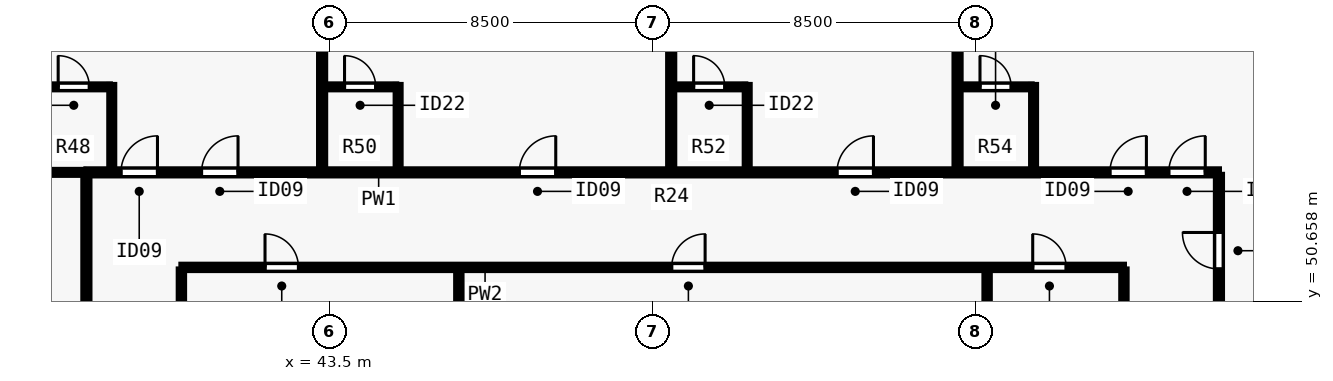
"""IFC4 building model, lengths in metres.
Left out: names, types, materials, properties, quantities, classifications, styles, units other than length and angle.
Written with IfcOpenShell. Run it as: python <this file> out.ifc"""

import sys

from ifc_helpers import new_model, si_unit, direction, frame, frame_2d, origin, place, context, subcontext, project, spatial, rectangle, extrude, element, fill, save


model = new_model("IFC4")
c1 = context("Model", 3, precision=1e-05, world=origin(), true_north=direction((0.0, 1.0)))
c2 = subcontext(c1, "Body", "Model", "MODEL_VIEW")
j1 = project(units=[si_unit("LENGTHUNIT", "METRE"), si_unit("PLANEANGLEUNIT", "RADIAN")], contexts=[c1])
p1 = place(None, origin())
s1 = spatial("IfcSite", under=j1, at=p1, CompositionType="ELEMENT")
p2 = place(p1, origin())
s2 = spatial("IfcBuilding", under=s1, at=p2, CompositionType="ELEMENT")
p3 = place(p2, frame((0.0, 0.0, 86.5)))
s3 = spatial("IfcBuildingStorey", under=s2, at=p3, CompositionType="ELEMENT", Elevation=86.5)
p4 = place(p3, frame((37.1, 54.05, 0.0), z_axis=(0.0, 0.0, 1.0), x_axis=(1.0, 0.0, 0.0)))
e1 = element("IfcWall", 1, at=p4, inside=s3, PredefinedType="PARTITIONING", context=c2, shape_type="SweptSolid", body=[
    extrude(rectangle(XDim=29.8, YDim=0.16, at=frame_2d((14.9, 0.0))), origin(), (0.0, 0.0, 1.0), 3.28),
])
p5 = place(p4, frame((0.91, 0.0, 0.0)))
e2 = element("IfcOpeningElement", 2, at=p5, cuts=e1, PredefinedType="OPENING", context=c2, shape_type="SweptSolid", body=[
    extrude(rectangle(XDim=0.96, YDim=2.15, at=frame_2d((0.48, 1.075))), frame((0.0, 0.09, 0.0), z_axis=(0.0, -1.0, 0.0), x_axis=(1.0, 0.0, 0.0)), (0.0, 0.0, 1.0), 0.18),
])
p6 = place(p4, frame((3.03, 0.0, 0.0)))
e3 = element("IfcOpeningElement", 3, at=p6, cuts=e1, PredefinedType="OPENING", context=c2, shape_type="SweptSolid", body=[
    extrude(rectangle(XDim=0.96, YDim=2.15, at=frame_2d((0.48, 1.075))), frame((0.0, 0.09, 0.0), z_axis=(0.0, -1.0, 0.0), x_axis=(1.0, 0.0, 0.0)), (0.0, 0.0, 1.0), 0.18),
])
p7 = place(p4, frame((11.39, 0.0, 0.0)))
e4 = element("IfcOpeningElement", 4, at=p7, cuts=e1, PredefinedType="OPENING", context=c2, shape_type="SweptSolid", body=[
    extrude(rectangle(XDim=0.96, YDim=2.15, at=frame_2d((0.48, 1.075))), frame((0.0, 0.09, 0.0), z_axis=(0.0, -1.0, 0.0), x_axis=(1.0, 0.0, 0.0)), (0.0, 0.0, 1.0), 0.18),
])
p8 = place(p4, frame((19.75, 0.0, 0.0)))
e5 = element("IfcOpeningElement", 5, at=p8, cuts=e1, PredefinedType="OPENING", context=c2, shape_type="SweptSolid", body=[
    extrude(rectangle(XDim=0.96, YDim=2.15, at=frame_2d((0.48, 1.075))), frame((0.0, 0.09, 0.0), z_axis=(0.0, -1.0, 0.0), x_axis=(1.0, 0.0, 0.0)), (0.0, 0.0, 1.0), 0.18),
])
p9 = place(p4, frame((26.931, 0.0, 0.0)))
e6 = element("IfcOpeningElement", 6, at=p9, cuts=e1, PredefinedType="OPENING", context=c2, shape_type="SweptSolid", body=[
    extrude(rectangle(XDim=0.96, YDim=2.15, at=frame_2d((0.48, 1.075))), frame((0.0, 0.09, 0.0), z_axis=(0.0, -1.0, 0.0), x_axis=(1.0, 0.0, 0.0)), (0.0, 0.0, 1.0), 0.18),
])
p10 = place(p4, frame((28.48, 0.0, 0.0)))
e7 = element("IfcOpeningElement", 7, at=p10, cuts=e1, PredefinedType="OPENING", context=c2, shape_type="SweptSolid", body=[
    extrude(rectangle(XDim=0.96, YDim=2.15, at=frame_2d((0.48, 1.075))), frame((0.0, 0.09, 0.0), z_axis=(0.0, -1.0, 0.0), x_axis=(1.0, 0.0, 0.0)), (0.0, 0.0, 1.0), 0.18),
])
p11 = place(p3, frame((37.1, 24.015, 0.0), z_axis=(0.0, 0.0, 1.0), x_axis=(0.0, 1.0, 0.0)))
e8 = element("IfcWall", 8, at=p11, inside=s3, PredefinedType="PARTITIONING", context=c2, shape_type="SweptSolid", body=[
    extrude(rectangle(XDim=29.97, YDim=0.16, at=frame_2d((14.985, 0.0))), origin(), (0.0, 0.0, 1.0), 3.28),
])
p12 = place(p11, frame((8.134, 0.0, 0.0)))
e9 = element("IfcOpeningElement", 9, at=p12, cuts=e8, PredefinedType="OPENING", context=c2, shape_type="SweptSolid", body=[
    extrude(rectangle(XDim=0.96, YDim=2.15, at=frame_2d((0.48, 1.075))), frame((0.0, 0.09, 0.0), z_axis=(0.0, -1.0, 0.0), x_axis=(1.0, 0.0, 0.0)), (0.0, 0.0, 1.0), 0.18),
])
p13 = place(p11, frame((22.934, 0.0, 0.0)))
e10 = element("IfcOpeningElement", 10, at=p13, cuts=e8, PredefinedType="OPENING", context=c2, shape_type="SweptSolid", body=[
    extrude(rectangle(XDim=0.96, YDim=2.15, at=frame_2d((0.48, 1.075))), frame((0.0, 0.09, 0.0), z_axis=(0.0, -1.0, 0.0), x_axis=(1.0, 0.0, 0.0)), (0.0, 0.0, 1.0), 0.18),
])
p14 = place(p3, frame((66.9, 24.015, 0.0), z_axis=(0.0, 0.0, 1.0), x_axis=(0.0, 1.0, 0.0)))
e11 = element("IfcWall", 11, at=p14, inside=s3, PredefinedType="PARTITIONING", context=c2, shape_type="SweptSolid", body=[
    extrude(rectangle(XDim=29.97, YDim=0.16, at=frame_2d((14.985, 0.0))), origin(), (0.0, 0.0, 1.0), 3.28),
])
p15 = place(p14, frame((3.911, 0.0, 0.0)))
e12 = element("IfcOpeningElement", 12, at=p15, cuts=e11, PredefinedType="OPENING", context=c2, shape_type="SweptSolid", body=[
    extrude(rectangle(XDim=0.96, YDim=2.15, at=frame_2d((0.48, 1.075))), frame((0.0, 0.09, 0.0), z_axis=(0.0, -1.0, 0.0), x_axis=(1.0, 0.0, 0.0)), (0.0, 0.0, 1.0), 0.18),
])
p16 = place(p14, frame((9.544, 0.0, 0.0)))
e13 = element("IfcOpeningElement", 13, at=p16, cuts=e11, PredefinedType="OPENING", context=c2, shape_type="SweptSolid", body=[
    extrude(rectangle(XDim=0.96, YDim=2.15, at=frame_2d((0.48, 1.075))), frame((0.0, 0.09, 0.0), z_axis=(0.0, -1.0, 0.0), x_axis=(1.0, 0.0, 0.0)), (0.0, 0.0, 1.0), 0.18),
])
p17 = place(p14, frame((15.625, 0.0, 0.0)))
e14 = element("IfcOpeningElement", 14, at=p17, cuts=e11, PredefinedType="OPENING", context=c2, shape_type="SweptSolid", body=[
    extrude(rectangle(XDim=0.96, YDim=2.15, at=frame_2d((0.48, 1.075))), frame((0.0, 0.09, 0.0), z_axis=(0.0, -1.0, 0.0), x_axis=(1.0, 0.0, 0.0)), (0.0, 0.0, 1.0), 0.18),
])
p18 = place(p14, frame((21.584, 0.0, 0.0)))
e15 = element("IfcOpeningElement", 15, at=p18, cuts=e11, PredefinedType="OPENING", context=c2, shape_type="SweptSolid", body=[
    extrude(rectangle(XDim=0.96, YDim=2.15, at=frame_2d((0.48, 1.075))), frame((0.0, 0.09, 0.0), z_axis=(0.0, -1.0, 0.0), x_axis=(1.0, 0.0, 0.0)), (0.0, 0.0, 1.0), 0.18),
])
p19 = place(p14, frame((27.494, 0.0, 0.0)))
e16 = element("IfcOpeningElement", 16, at=p19, cuts=e11, PredefinedType="OPENING", context=c2, shape_type="SweptSolid", body=[
    extrude(rectangle(XDim=0.96, YDim=2.15, at=frame_2d((0.48, 1.075))), frame((0.0, 0.09, 0.0), z_axis=(0.0, -1.0, 0.0), x_axis=(1.0, 0.0, 0.0)), (0.0, 0.0, 1.0), 0.18),
])
p20 = place(p3, frame((39.6, 51.55, 0.0), z_axis=(0.0, 0.0, 1.0), x_axis=(1.0, 0.0, 0.0)))
e17 = element("IfcWall", 17, at=p20, inside=s3, PredefinedType="PARTITIONING", context=c2, shape_type="SweptSolid", body=[
    extrude(rectangle(XDim=24.8, YDim=0.14, at=frame_2d((12.4, 0.0))), origin(), (0.0, 0.0, 1.0), 3.28),
])
p21 = place(p20, frame((2.2, 0.0, 0.0)))
e18 = element("IfcOpeningElement", 18, at=p21, cuts=e17, PredefinedType="OPENING", context=c2, shape_type="SweptSolid", body=[
    extrude(rectangle(XDim=0.88, YDim=2.1, at=frame_2d((0.44, 1.05))), frame((0.0, 0.08, 0.0), z_axis=(0.0, -1.0, 0.0), x_axis=(1.0, 0.0, 0.0)), (0.0, 0.0, 1.0), 0.16),
])
p22 = place(p20, frame((12.9, 0.0, 0.0)))
e19 = element("IfcOpeningElement", 19, at=p22, cuts=e17, PredefinedType="OPENING", context=c2, shape_type="SweptSolid", body=[
    extrude(rectangle(XDim=0.88, YDim=2.1, at=frame_2d((0.44, 1.05))), frame((0.0, 0.08, 0.0), z_axis=(0.0, -1.0, 0.0), x_axis=(1.0, 0.0, 0.0)), (0.0, 0.0, 1.0), 0.16),
])
p23 = place(p20, frame((22.4, 0.0, 0.0)))
e20 = element("IfcOpeningElement", 20, at=p23, cuts=e17, PredefinedType="OPENING", context=c2, shape_type="SweptSolid", body=[
    extrude(rectangle(XDim=0.88, YDim=2.1, at=frame_2d((0.44, 1.05))), frame((0.0, 0.08, 0.0), z_axis=(0.0, -1.0, 0.0), x_axis=(1.0, 0.0, 0.0)), (0.0, 0.0, 1.0), 0.16),
])
p24 = place(p3, frame((39.6, 40.8, 0.0), z_axis=(0.0, 0.0, 1.0), x_axis=(0.0, 1.0, 0.0)))
e21 = element("IfcWall", 21, at=p24, inside=s3, PredefinedType="PARTITIONING", context=c2, shape_type="SweptSolid", body=[
    extrude(rectangle(XDim=10.695, YDim=0.14, at=frame_2d((5.348, 0.0))), origin(), (0.0, 0.0, 1.0), 3.28),
])
p25 = place(p24, frame((2.5, 0.0, 0.0)))
e22 = element("IfcOpeningElement", 22, at=p25, cuts=e21, PredefinedType="OPENING", context=c2, shape_type="SweptSolid", body=[
    extrude(rectangle(XDim=0.88, YDim=2.1, at=frame_2d((0.44, 1.05))), frame((0.0, 0.08, 0.0), z_axis=(0.0, -1.0, 0.0), x_axis=(1.0, 0.0, 0.0)), (0.0, 0.0, 1.0), 0.16),
])
p26 = place(p3, frame((64.4, 40.8, 0.0), z_axis=(0.0, 0.0, 1.0), x_axis=(0.0, 1.0, 0.0)))
e23 = element("IfcWall", 23, at=p26, inside=s3, PredefinedType="PARTITIONING", context=c2, shape_type="SweptSolid", body=[
    extrude(rectangle(XDim=10.695, YDim=0.14, at=frame_2d((5.348, 0.0))), origin(), (0.0, 0.0, 1.0), 3.28),
])
p27 = place(p26, frame((2.5, 0.0, 0.0)))
e24 = element("IfcOpeningElement", 24, at=p27, cuts=e23, PredefinedType="OPENING", context=c2, shape_type="SweptSolid", body=[
    extrude(rectangle(XDim=0.88, YDim=2.1, at=frame_2d((0.44, 1.05))), frame((0.0, 0.08, 0.0), z_axis=(0.0, -1.0, 0.0), x_axis=(1.0, 0.0, 0.0)), (0.0, 0.0, 1.0), 0.16),
])
p28 = place(p3, frame((46.9, 47.76, 0.0), z_axis=(0.0, 0.0, 1.0), x_axis=(0.0, 1.0, 0.0)))
e25 = element("IfcWall", 25, at=p28, inside=s3, PredefinedType="PARTITIONING", context=c2, shape_type="SweptSolid", body=[
    extrude(rectangle(XDim=3.735, YDim=0.14, at=frame_2d((1.868, 0.0))), origin(), (0.0, 0.0, 1.0), 3.28),
])
p29 = place(p3, frame((60.8, 47.76, 0.0), z_axis=(0.0, 0.0, 1.0), x_axis=(0.0, 1.0, 0.0)))
e26 = element("IfcWall", 26, at=p29, inside=s3, PredefinedType="PARTITIONING", context=c2, shape_type="SweptSolid", body=[
    extrude(rectangle(XDim=3.735, YDim=0.14, at=frame_2d((1.868, 0.0))), origin(), (0.0, 0.0, 1.0), 2.439),
])
p30 = place(p3, frame((37.768, 54.115, 0.0), z_axis=(0.0, 0.0, 1.0), x_axis=(0.0, 1.0, 0.0)))
e27 = element("IfcWall", 27, at=p30, inside=s3, PredefinedType="PLUMBINGWALL", context=c2, shape_type="SweptSolid", body=[
    extrude(rectangle(XDim=2.235, YDim=0.13, at=frame_2d((1.118, 0.0))), origin(), (0.0, 0.0, 1.0), 2.439),
])
p31 = place(p3, frame((35.833, 56.3, 0.0), z_axis=(0.0, 0.0, 1.0), x_axis=(1.0, 0.0, 0.0)))
e28 = element("IfcWall", 28, at=p31, inside=s3, PredefinedType="PLUMBINGWALL", context=c2, shape_type="SweptSolid", body=[
    extrude(rectangle(XDim=1.885, YDim=0.13, at=frame_2d((0.942, 0.0))), origin(), (0.0, 0.0, 1.0), 3.28),
])
p32 = place(p31, frame((0.525, 0.0, 0.0)))
e29 = element("IfcOpeningElement", 29, at=p32, cuts=e28, PredefinedType="OPENING", context=c2, shape_type="SweptSolid", body=[
    extrude(rectangle(XDim=0.82, YDim=2.1, at=frame_2d((0.41, 1.05))), frame((0.0, 0.075, 0.0), z_axis=(0.0, -1.0, 0.0), x_axis=(1.0, 0.0, 0.0)), (0.0, 0.0, 1.0), 0.15),
])
p33 = place(p3, frame((35.833, 54.05, 0.0), z_axis=(0.0, 0.0, 1.0), x_axis=(1.0, 0.0, 0.0)))
e30 = element("IfcWall", 30, at=p33, inside=s3, PredefinedType="PLUMBINGWALL", context=c2, shape_type="SweptSolid", body=[
    extrude(rectangle(XDim=1.188, YDim=0.13, at=frame_2d((0.594, 0.0))), origin(), (0.0, 0.0, 1.0), 3.28),
])
p34 = place(p3, frame((43.302, 54.115, 0.0), z_axis=(0.0, 0.0, 1.0), x_axis=(0.0, 1.0, 0.0)))
e31 = element("IfcWall", 31, at=p34, inside=s3, PredefinedType="PARTITIONING", context=c2, shape_type="SweptSolid", body=[
    extrude(rectangle(XDim=10.04, YDim=0.16, at=frame_2d((5.02, 0.0))), origin(), (0.0, 0.0, 1.0), 3.28),
])
p35 = place(p3, frame((45.302, 54.115, 0.0), z_axis=(0.0, 0.0, 1.0), x_axis=(0.0, 1.0, 0.0)))
e32 = element("IfcWall", 32, at=p35, inside=s3, PredefinedType="PLUMBINGWALL", context=c2, shape_type="SweptSolid", body=[
    extrude(rectangle(XDim=2.235, YDim=0.13, at=frame_2d((1.118, 0.0))), origin(), (0.0, 0.0, 1.0), 3.28),
])
p36 = place(p3, frame((43.367, 56.3, 0.0), z_axis=(0.0, 0.0, 1.0), x_axis=(1.0, 0.0, 0.0)))
e33 = element("IfcWall", 33, at=p36, inside=s3, PredefinedType="PLUMBINGWALL", context=c2, shape_type="SweptSolid", body=[
    extrude(rectangle(XDim=1.885, YDim=0.13, at=frame_2d((0.942, 0.0))), origin(), (0.0, 0.0, 1.0), 3.28),
])
p37 = place(p36, frame((0.525, 0.0, 0.0)))
e34 = element("IfcOpeningElement", 34, at=p37, cuts=e33, PredefinedType="OPENING", context=c2, shape_type="SweptSolid", body=[
    extrude(rectangle(XDim=0.82, YDim=2.1, at=frame_2d((0.41, 1.05))), frame((0.0, 0.075, 0.0), z_axis=(0.0, -1.0, 0.0), x_axis=(1.0, 0.0, 0.0)), (0.0, 0.0, 1.0), 0.15),
])
p38 = place(p3, frame((52.488, 54.115, 0.0), z_axis=(0.0, 0.0, 1.0), x_axis=(0.0, 1.0, 0.0)))
e35 = element("IfcWall", 35, at=p38, inside=s3, PredefinedType="PARTITIONING", context=c2, shape_type="SweptSolid", body=[
    extrude(rectangle(XDim=10.04, YDim=0.16, at=frame_2d((5.02, 0.0))), origin(), (0.0, 0.0, 1.0), 2.849),
])
p39 = place(p3, frame((54.488, 54.115, 0.0), z_axis=(0.0, 0.0, 1.0), x_axis=(0.0, 1.0, 0.0)))
e36 = element("IfcWall", 36, at=p39, inside=s3, PredefinedType="PLUMBINGWALL", context=c2, shape_type="SweptSolid", body=[
    extrude(rectangle(XDim=2.235, YDim=0.13, at=frame_2d((1.118, 0.0))), origin(), (0.0, 0.0, 1.0), 3.28),
])
p40 = place(p3, frame((52.552, 56.3, 0.0), z_axis=(0.0, 0.0, 1.0), x_axis=(1.0, 0.0, 0.0)))
e37 = element("IfcWall", 37, at=p40, inside=s3, PredefinedType="PLUMBINGWALL", context=c2, shape_type="SweptSolid", body=[
    extrude(rectangle(XDim=1.885, YDim=0.13, at=frame_2d((0.942, 0.0))), origin(), (0.0, 0.0, 1.0), 3.28),
])
p41 = place(p40, frame((0.525, 0.0, 0.0)))
e38 = element("IfcOpeningElement", 38, at=p41, cuts=e37, PredefinedType="OPENING", context=c2, shape_type="SweptSolid", body=[
    extrude(rectangle(XDim=0.82, YDim=2.1, at=frame_2d((0.41, 1.05))), frame((0.0, 0.075, 0.0), z_axis=(0.0, -1.0, 0.0), x_axis=(1.0, 0.0, 0.0)), (0.0, 0.0, 1.0), 0.15),
])
p42 = place(p3, frame((60.022, 54.115, 0.0), z_axis=(0.0, 0.0, 1.0), x_axis=(0.0, 1.0, 0.0)))
e39 = element("IfcWall", 39, at=p42, inside=s3, PredefinedType="PARTITIONING", context=c2, shape_type="SweptSolid", body=[
    extrude(rectangle(XDim=10.115, YDim=0.16, at=frame_2d((5.058, 0.0))), origin(), (0.0, 0.0, 1.0), 3.28),
])
p43 = place(p3, frame((62.022, 54.115, 0.0), z_axis=(0.0, 0.0, 1.0), x_axis=(0.0, 1.0, 0.0)))
e40 = element("IfcWall", 40, at=p43, inside=s3, PredefinedType="PLUMBINGWALL", context=c2, shape_type="SweptSolid", body=[
    extrude(rectangle(XDim=2.235, YDim=0.13, at=frame_2d((1.118, 0.0))), origin(), (0.0, 0.0, 1.0), 3.28),
])
p44 = place(p3, frame((60.087, 56.3, 0.0), z_axis=(0.0, 0.0, 1.0), x_axis=(1.0, 0.0, 0.0)))
e41 = element("IfcWall", 41, at=p44, inside=s3, PredefinedType="PLUMBINGWALL", context=c2, shape_type="SweptSolid", body=[
    extrude(rectangle(XDim=1.885, YDim=0.13, at=frame_2d((0.942, 0.0))), origin(), (0.0, 0.0, 1.0), 3.28),
])
p45 = place(p44, frame((0.525, 0.0, 0.0)))
e42 = element("IfcOpeningElement", 42, at=p45, cuts=e41, PredefinedType="OPENING", context=c2, shape_type="SweptSolid", body=[
    extrude(rectangle(XDim=0.82, YDim=2.1, at=frame_2d((0.41, 1.05))), frame((0.0, 0.075, 0.0), z_axis=(0.0, -1.0, 0.0), x_axis=(1.0, 0.0, 0.0)), (0.0, 0.0, 1.0), 0.15),
])
p46 = place(p21, origin())
e43 = element("IfcDoor", 43, at=p46, inside=s3, OperationType="SINGLE_SWING_LEFT", PredefinedType="DOOR", context=c2, shape_type="SweptSolid", body=[
    extrude(rectangle(XDim=0.88, YDim=2.1, at=frame_2d((0.44, 1.05))), frame((0.0, 0.025, 0.0), z_axis=(0.0, -1.0, 0.0), x_axis=(1.0, 0.0, 0.0)), (0.0, 0.0, 1.0), 0.05),
])
fill(e18, e43)
p47 = place(p22, origin())
e44 = element("IfcDoor", 44, at=p47, inside=s3, OperationType="SINGLE_SWING_RIGHT", PredefinedType="DOOR", context=c2, shape_type="SweptSolid", body=[
    extrude(rectangle(XDim=0.88, YDim=2.1, at=frame_2d((0.44, 1.05))), frame((0.0, 0.025, 0.0), z_axis=(0.0, -1.0, 0.0), x_axis=(1.0, 0.0, 0.0)), (0.0, 0.0, 1.0), 0.05),
])
fill(e19, e44)
p48 = place(p23, origin())
e45 = element("IfcDoor", 45, at=p48, inside=s3, OperationType="SINGLE_SWING_LEFT", PredefinedType="DOOR", context=c2, shape_type="SweptSolid", body=[
    extrude(rectangle(XDim=0.88, YDim=2.1, at=frame_2d((0.44, 1.05))), frame((0.0, 0.025, 0.0), z_axis=(0.0, -1.0, 0.0), x_axis=(1.0, 0.0, 0.0)), (0.0, 0.0, 1.0), 0.05),
])
fill(e20, e45)
p49 = place(p5, origin())
e46 = element("IfcDoor", 46, at=p49, inside=s3, OperationType="SINGLE_SWING_RIGHT", PredefinedType="DOOR", context=c2, shape_type="SweptSolid", body=[
    extrude(rectangle(XDim=0.96, YDim=2.15, at=frame_2d((0.48, 1.075))), frame((0.0, 0.025, 0.0), z_axis=(0.0, -1.0, 0.0), x_axis=(1.0, 0.0, 0.0)), (0.0, 0.0, 1.0), 0.05),
])
fill(e2, e46)
p50 = place(p32, origin())
e47 = element("IfcDoor", 47, at=p50, inside=s3, OperationType="SINGLE_SWING_LEFT", PredefinedType="DOOR", context=c2, shape_type="SweptSolid", body=[
    extrude(rectangle(XDim=0.82, YDim=2.1, at=frame_2d((0.41, 1.05))), frame((0.0, 0.025, 0.0), z_axis=(0.0, -1.0, 0.0), x_axis=(1.0, 0.0, 0.0)), (0.0, 0.0, 1.0), 0.05),
])
fill(e29, e47)
p51 = place(p6, origin())
e48 = element("IfcDoor", 48, at=p51, inside=s3, OperationType="SINGLE_SWING_RIGHT", PredefinedType="DOOR", context=c2, shape_type="SweptSolid", body=[
    extrude(rectangle(XDim=0.96, YDim=2.15, at=frame_2d((0.48, 1.075))), frame((0.0, 0.025, 0.0), z_axis=(0.0, -1.0, 0.0), x_axis=(1.0, 0.0, 0.0)), (0.0, 0.0, 1.0), 0.05),
])
fill(e3, e48)
p52 = place(p37, origin())
e49 = element("IfcDoor", 49, at=p52, inside=s3, OperationType="SINGLE_SWING_LEFT", PredefinedType="DOOR", context=c2, shape_type="SweptSolid", body=[
    extrude(rectangle(XDim=0.82, YDim=2.1, at=frame_2d((0.41, 1.05))), frame((0.0, 0.025, 0.0), z_axis=(0.0, -1.0, 0.0), x_axis=(1.0, 0.0, 0.0)), (0.0, 0.0, 1.0), 0.05),
])
fill(e34, e49)
p53 = place(p7, origin())
e50 = element("IfcDoor", 50, at=p53, inside=s3, OperationType="SINGLE_SWING_RIGHT", PredefinedType="DOOR", context=c2, shape_type="SweptSolid", body=[
    extrude(rectangle(XDim=0.96, YDim=2.15, at=frame_2d((0.48, 1.075))), frame((0.0, 0.025, 0.0), z_axis=(0.0, -1.0, 0.0), x_axis=(1.0, 0.0, 0.0)), (0.0, 0.0, 1.0), 0.05),
])
fill(e4, e50)
p54 = place(p41, origin())
e51 = element("IfcDoor", 51, at=p54, inside=s3, OperationType="SINGLE_SWING_LEFT", PredefinedType="DOOR", context=c2, shape_type="SweptSolid", body=[
    extrude(rectangle(XDim=0.82, YDim=2.1, at=frame_2d((0.41, 1.05))), frame((0.0, 0.025, 0.0), z_axis=(0.0, -1.0, 0.0), x_axis=(1.0, 0.0, 0.0)), (0.0, 0.0, 1.0), 0.05),
])
fill(e38, e51)
p55 = place(p8, origin())
e52 = element("IfcDoor", 52, at=p55, inside=s3, OperationType="SINGLE_SWING_RIGHT", PredefinedType="DOOR", context=c2, shape_type="SweptSolid", body=[
    extrude(rectangle(XDim=0.96, YDim=2.15, at=frame_2d((0.48, 1.075))), frame((0.0, 0.025, 0.0), z_axis=(0.0, -1.0, 0.0), x_axis=(1.0, 0.0, 0.0)), (0.0, 0.0, 1.0), 0.05),
])
fill(e5, e52)
p56 = place(p45, origin())
e53 = element("IfcDoor", 53, at=p56, inside=s3, OperationType="SINGLE_SWING_LEFT", PredefinedType="DOOR", context=c2, shape_type="SweptSolid", body=[
    extrude(rectangle(XDim=0.82, YDim=2.1, at=frame_2d((0.41, 1.05))), frame((0.0, 0.025, 0.0), z_axis=(0.0, -1.0, 0.0), x_axis=(1.0, 0.0, 0.0)), (0.0, 0.0, 1.0), 0.05),
])
fill(e42, e53)
p57 = place(p9, origin())
e54 = element("IfcDoor", 54, at=p57, inside=s3, OperationType="SINGLE_SWING_RIGHT", PredefinedType="DOOR", context=c2, shape_type="SweptSolid", body=[
    extrude(rectangle(XDim=0.96, YDim=2.15, at=frame_2d((0.48, 1.075))), frame((0.0, 0.025, 0.0), z_axis=(0.0, -1.0, 0.0), x_axis=(1.0, 0.0, 0.0)), (0.0, 0.0, 1.0), 0.05),
])
fill(e6, e54)
p58 = place(p10, origin())
e55 = element("IfcDoor", 55, at=p58, inside=s3, OperationType="SINGLE_SWING_RIGHT", PredefinedType="DOOR", context=c2, shape_type="SweptSolid", body=[
    extrude(rectangle(XDim=0.96, YDim=2.15, at=frame_2d((0.48, 1.075))), frame((0.0, 0.025, 0.0), z_axis=(0.0, -1.0, 0.0), x_axis=(1.0, 0.0, 0.0)), (0.0, 0.0, 1.0), 0.05),
])
fill(e7, e55)
p59 = place(p19, origin())
e56 = element("IfcDoor", 56, at=p59, inside=s3, OperationType="SINGLE_SWING_RIGHT", PredefinedType="DOOR", context=c2, shape_type="SweptSolid", body=[
    extrude(rectangle(XDim=0.96, YDim=2.15, at=frame_2d((0.48, 1.075))), frame((0.0, 0.025, 0.0), z_axis=(0.0, -1.0, 0.0), x_axis=(1.0, 0.0, 0.0)), (0.0, 0.0, 1.0), 0.05),
])
fill(e16, e56)
save(model, sys.argv[1])
